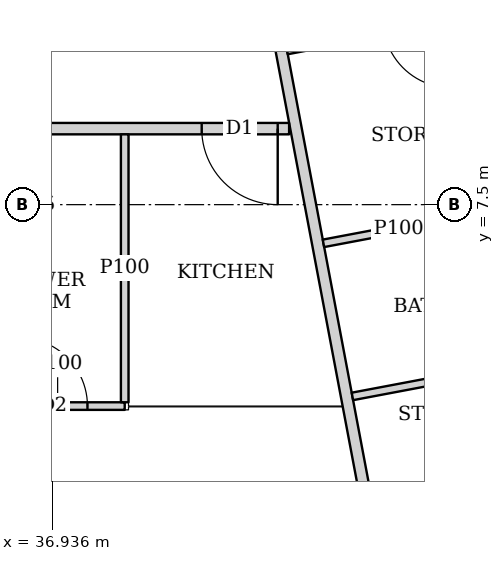
"""IFC4 building model, lengths in metres.
Left out: names, types, materials, properties, quantities, classifications, styles, units other than length and angle.
Written with IfcOpenShell. Run it as: python <this file> out.ifc"""

import sys

from ifc_helpers import new_model, si_unit, direction, frame, frame_2d, origin, place, context, subcontext, project, spatial, rectangle, extrude, element, fill, save


model = new_model("IFC4")
c1 = context("Model", 3, precision=1e-05, world=origin(), true_north=direction((0.0, 1.0)))
c2 = subcontext(c1, "Body", "Model", "MODEL_VIEW")
j1 = project(units=[si_unit("LENGTHUNIT", "METRE"), si_unit("PLANEANGLEUNIT", "RADIAN")], contexts=[c1])
p1 = place(None, origin())
s1 = spatial("IfcSite", under=j1, at=p1, CompositionType="ELEMENT")
p2 = place(p1, origin())
s2 = spatial("IfcBuilding", under=s1, at=p2, CompositionType="ELEMENT")
p3 = place(p2, frame((0.0, 0.0, 208.7)))
s3 = spatial("IfcBuildingStorey", under=s2, at=p3, CompositionType="ELEMENT", Elevation=208.7)
p4 = place(p3, frame((40.053, 8.5, 0.0), z_axis=(0.0, 0.0, 1.0), x_axis=(-1.0, 0.0, 0.0)))
e1 = element("IfcWall", 1, at=p4, inside=s3, PredefinedType="SOLIDWALL", context=c2, shape_type="SweptSolid", body=[
    extrude(rectangle(XDim=31.052, YDim=0.15, at=frame_2d((15.526, 0.0))), origin(), (0.0, 0.0, 1.0), 3.5),
])
p5 = place(p4, frame((29.178, 0.0, 0.0)))
e2 = element("IfcOpeningElement", 2, at=p5, cuts=e1, PredefinedType="OPENING", context=c2, shape_type="SweptSolid", body=[
    extrude(rectangle(XDim=1.0, YDim=2.1, at=frame_2d((0.5, 1.05))), frame((0.0, 0.085, 0.0), z_axis=(0.0, -1.0, 0.0), x_axis=(1.0, 0.0, 0.0)), (0.0, 0.0, 1.0), 0.17),
])
p6 = place(p4, frame((19.953, 0.0, 0.0)))
e3 = element("IfcOpeningElement", 3, at=p6, cuts=e1, PredefinedType="OPENING", context=c2, shape_type="SweptSolid", body=[
    extrude(rectangle(XDim=1.0, YDim=2.1, at=frame_2d((0.5, 1.05))), frame((0.0, 0.085, 0.0), z_axis=(0.0, -1.0, 0.0), x_axis=(1.0, 0.0, 0.0)), (0.0, 0.0, 1.0), 0.17),
])
p7 = place(p4, frame((12.753, 0.0, 0.0)))
e4 = element("IfcOpeningElement", 4, at=p7, cuts=e1, PredefinedType="OPENING", context=c2, shape_type="SweptSolid", body=[
    extrude(rectangle(XDim=1.0, YDim=2.1, at=frame_2d((0.5, 1.05))), frame((0.0, 0.085, 0.0), z_axis=(0.0, -1.0, 0.0), x_axis=(1.0, 0.0, 0.0)), (0.0, 0.0, 1.0), 0.17),
])
p8 = place(p4, frame((0.15, 0.0, 0.0)))
e5 = element("IfcOpeningElement", 5, at=p8, cuts=e1, PredefinedType="OPENING", context=c2, shape_type="SweptSolid", body=[
    extrude(rectangle(XDim=1.0, YDim=2.1, at=frame_2d((0.5, 1.05))), frame((0.0, 0.085, 0.0), z_axis=(0.0, -1.0, 0.0), x_axis=(1.0, 0.0, 0.0)), (0.0, 0.0, 1.0), 0.17),
])
p9 = place(p3, frame((33.68, 42.723, 0.0), z_axis=(0.0, 0.0, 1.0), x_axis=(0.185601160014, -0.982625162207, 0.0)))
e6 = element("IfcWall", 6, at=p9, inside=s3, PredefinedType="SOLIDWALL", context=c2, shape_type="SweptSolid", body=[
    extrude(rectangle(XDim=41.051, YDim=0.15, at=frame_2d((20.526, 0.0))), origin(), (0.0, 0.0, 1.0), 2.5),
])
p10 = place(p9, frame((12.307, 0.0, 0.0)))
e7 = element("IfcOpeningElement", 7, at=p10, cuts=e6, PredefinedType="OPENING", context=c2, shape_type="SweptSolid", body=[
    extrude(rectangle(XDim=1.0, YDim=2.1, at=frame_2d((0.5, 1.05))), frame((0.0, 0.085, 0.0), z_axis=(0.0, -1.0, 0.0), x_axis=(1.0, 0.0, 0.0)), (0.0, 0.0, 1.0), 0.17),
])
p11 = place(p9, frame((16.123, 0.0, 0.0)))
e8 = element("IfcOpeningElement", 8, at=p11, cuts=e6, PredefinedType="OPENING", context=c2, shape_type="SweptSolid", body=[
    extrude(rectangle(XDim=1.0, YDim=2.1, at=frame_2d((0.5, 1.05))), frame((0.0, 0.085, 0.0), z_axis=(0.0, -1.0, 0.0), x_axis=(1.0, 0.0, 0.0)), (0.0, 0.0, 1.0), 0.17),
])
p12 = place(p9, frame((30.902, 0.0, 0.0)))
e9 = element("IfcOpeningElement", 9, at=p12, cuts=e6, PredefinedType="OPENING", context=c2, shape_type="SweptSolid", body=[
    extrude(rectangle(XDim=1.0, YDim=2.1, at=frame_2d((0.5, 1.05))), frame((0.0, 0.085, 0.0), z_axis=(0.0, -1.0, 0.0), x_axis=(1.0, 0.0, 0.0)), (0.0, 0.0, 1.0), 0.17),
])
p13 = place(p3, frame((37.89, 4.85, 0.0), z_axis=(0.0, 0.0, 1.0), x_axis=(-1.0, 0.0, 0.0)))
e10 = element("IfcWall", 10, at=p13, inside=s3, PredefinedType="PARTITIONING", context=c2, shape_type="SweptSolid", body=[
    extrude(rectangle(XDim=1.765, YDim=0.1, at=frame_2d((0.882, 0.0))), origin(), (0.0, 0.0, 1.0), 3.5),
])
p14 = place(p13, frame((0.49, 0.0, 0.0)))
e11 = element("IfcOpeningElement", 11, at=p14, cuts=e10, PredefinedType="OPENING", context=c2, shape_type="SweptSolid", body=[
    extrude(rectangle(XDim=0.9, YDim=2.1, at=frame_2d((0.45, 1.05))), frame((0.0, 0.06, 0.0), z_axis=(0.0, -1.0, 0.0), x_axis=(1.0, 0.0, 0.0)), (0.0, 0.0, 1.0), 0.12),
])
p15 = place(p3, frame((37.89, 4.9, 0.0), z_axis=(0.0, 0.0, 1.0), x_axis=(0.0, 1.0, 0.0)))
e12 = element("IfcWall", 12, at=p15, inside=s3, PredefinedType="PARTITIONING", context=c2, shape_type="SweptSolid", body=[
    extrude(rectangle(XDim=3.525, YDim=0.1, at=frame_2d((1.763, 0.0))), origin(), (0.0, 0.0, 1.0), 3.5),
])
p16 = place(p3, frame((43.49, 10.183, 0.0), z_axis=(0.0, 0.0, 1.0), x_axis=(-0.982588017646, -0.185797706064, 0.0)))
e13 = element("IfcWall", 13, at=p16, inside=s3, PredefinedType="PARTITIONING", context=c2, shape_type="SweptSolid", body=[
    extrude(rectangle(XDim=3.525, YDim=0.1, at=frame_2d((1.763, 0.0))), origin(), (0.0, 0.0, 1.0), 3.5),
])
p17 = place(p16, frame((1.325, 0.0, 0.0)))
e14 = element("IfcOpeningElement", 14, at=p17, cuts=e13, PredefinedType="OPENING", context=c2, shape_type="SweptSolid", body=[
    extrude(rectangle(XDim=0.9, YDim=2.1, at=frame_2d((0.45, 1.05))), frame((0.0, 0.06, 0.0), z_axis=(0.0, -1.0, 0.0), x_axis=(1.0, 0.0, 0.0)), (0.0, 0.0, 1.0), 0.12),
])
p18 = place(p3, frame((42.49, 7.366, 0.0), z_axis=(0.0, 0.0, 1.0), x_axis=(-0.982620917875, -0.185623629302, 0.0)))
e15 = element("IfcWall", 15, at=p18, inside=s3, PredefinedType="PARTITIONING", context=c2, shape_type="SweptSolid", body=[
    extrude(rectangle(XDim=2.02, YDim=0.1, at=frame_2d((1.01, 0.0))), origin(), (0.0, 0.0, 1.0), 3.5),
])
p19 = place(p3, frame((44.35, 5.631, 0.0), z_axis=(0.0, 0.0, 1.0), x_axis=(-0.982638553676, -0.185530247748, 0.0)))
e16 = element("IfcWall", 16, at=p19, inside=s3, PredefinedType="PARTITIONING", context=c2, shape_type="SweptSolid", body=[
    extrude(rectangle(XDim=3.525, YDim=0.1, at=frame_2d((1.763, 0.0))), origin(), (0.0, 0.0, 1.0), 3.5),
])
p20 = place(p3, frame((41.192, 3.356, 0.0), z_axis=(0.0, 0.0, 1.0), x_axis=(0.982588017646, 0.185797706064, 0.0)))
e17 = element("IfcWall", 17, at=p20, inside=s3, PredefinedType="PARTITIONING", context=c2, shape_type="SweptSolid", body=[
    extrude(rectangle(XDim=3.525, YDim=0.1, at=frame_2d((1.763, 0.0))), origin(), (0.0, 0.0, 1.0), 3.5),
])
p21 = place(p20, frame((1.7, 0.0, 0.0)))
e18 = element("IfcOpeningElement", 18, at=p21, cuts=e17, PredefinedType="OPENING", context=c2, shape_type="SweptSolid", body=[
    extrude(rectangle(XDim=0.9, YDim=2.1, at=frame_2d((0.45, 1.05))), frame((0.0, 0.06, 0.0), z_axis=(0.0, -1.0, 0.0), x_axis=(1.0, 0.0, 0.0)), (0.0, 0.0, 1.0), 0.12),
])
p22 = place(p14, origin())
e19 = element("IfcDoor", 19, at=p22, inside=s3, OperationType="SINGLE_SWING_LEFT", PredefinedType="DOOR", context=c2, shape_type="SweptSolid", body=[
    extrude(rectangle(XDim=0.9, YDim=2.1, at=frame_2d((0.45, 1.05))), frame((0.0, 0.025, 0.0), z_axis=(0.0, -1.0, 0.0), x_axis=(1.0, 0.0, 0.0)), (0.0, 0.0, 1.0), 0.05),
])
fill(e11, e19)
p23 = place(p8, origin())
e20 = element("IfcDoor", 20, at=p23, inside=s3, OperationType="SINGLE_SWING_LEFT", PredefinedType="DOOR", context=c2, shape_type="SweptSolid", body=[
    extrude(rectangle(XDim=1.0, YDim=2.1, at=frame_2d((0.5, 1.05))), frame((0.0, 0.025, 0.0), z_axis=(0.0, -1.0, 0.0), x_axis=(1.0, 0.0, 0.0)), (0.0, 0.0, 1.0), 0.05),
])
fill(e5, e20)
save(model, sys.argv[1])
